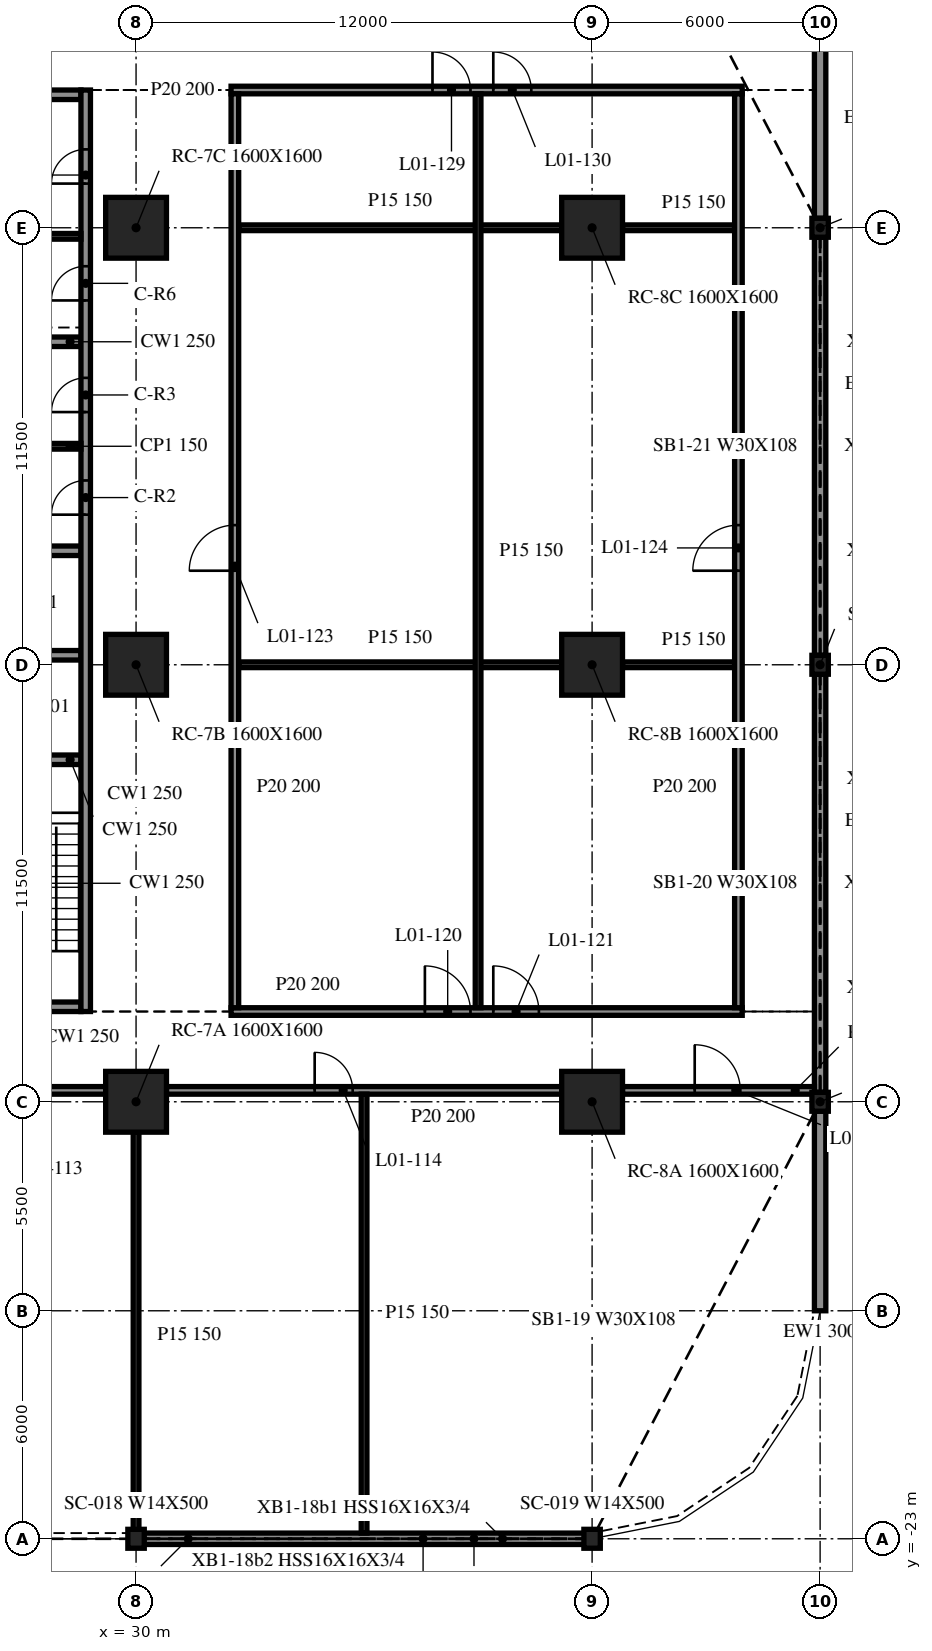
"""IFC4 building model, lengths in metres.
Left out: names, types, materials, properties, quantities, classifications, styles, units other than length and angle.
Written with IfcOpenShell. Run it as: python <this file> out.ifc"""

import sys

from ifc_helpers import new_model, si_unit, direction, frame, frame_2d, origin, origin_2d, place, context, subcontext, project, spatial, rectangle, i_section, extrude, element, fill, save


model = new_model("IFC4")
c1 = context("Model", 3, precision=1e-05, world=origin(), true_north=direction((0.0, 1.0)))
c2 = subcontext(c1, "Body", "Model", "MODEL_VIEW")
j1 = project(units=[si_unit("LENGTHUNIT", "METRE"), si_unit("PLANEANGLEUNIT", "RADIAN")], contexts=[c1])
p1 = place(None, origin())
s1 = spatial("IfcSite", under=j1, at=p1, CompositionType="ELEMENT")
p2 = place(p1, origin())
s2 = spatial("IfcBuilding", under=s1, at=p2, CompositionType="ELEMENT")
p3 = place(p2, frame((0.0, 0.0, 7.2)))
s3 = spatial("IfcBuildingStorey", under=s2, at=p3, CompositionType="ELEMENT", Elevation=7.2)
for number, where, z_axis, x_axis in (
    (1, (30.0, -11.5, -0.34), (0.0, 0.0, 1.0), (1.0, 0.0, 0.0)),
    (2, (30.0, 0.0, -0.34), (0.0, 0.0, 1.0), (1.0, 0.0, 0.0)),
    (3, (30.0, 11.5, -0.34), (0.0, 0.0, 1.0), (1.0, 0.0, 0.0)),
    (4, (42.0, -11.5, -0.34), (0.0, 0.0, 1.0), (1.0, 0.0, 0.0)),
    (5, (42.0, 0.0, -0.34), (0.0, 0.0, 1.0), (1.0, 0.0, 0.0)),
    (6, (42.0, 11.5, -0.34), (0.0, 0.0, 1.0), (1.0, 0.0, 0.0)),
):
    element("IfcColumn", number, at=place(p3, frame(where, z_axis=z_axis, x_axis=x_axis)), inside=s3, PredefinedType="COLUMN", context=c2, shape_type="SweptSolid", body=[
        extrude(rectangle(XDim=1.6, YDim=1.6, at=origin_2d()), origin(), (0.0, 0.0, 1.0), 4.3),
    ])
for number, where, z_axis, x_axis in (
    (7, (30.0, -23.0, -0.34), (0.0, 0.0, 1.0), (1.0, 0.0, 0.0)),
    (8, (42.0, -23.0, -0.34), (0.0, 0.0, 1.0), (1.0, 0.0, 0.0)),
    (9, (48.0, -11.5, -0.34), (0.0, 0.0, 1.0), (1.0, 0.0, 0.0)),
    (10, (48.0, 0.0, -0.34), (0.0, 0.0, 1.0), (1.0, 0.0, 0.0)),
    (11, (48.0, 11.5, -0.34), (0.0, 0.0, 1.0), (1.0, 0.0, 0.0)),
):
    element("IfcColumn", number, at=place(p3, frame(where, z_axis=z_axis, x_axis=x_axis)), inside=s3, PredefinedType="COLUMN", context=c2, shape_type="SweptSolid", body=[
        extrude(i_section(OverallWidth=0.432, OverallDepth=0.498, WebThickness=0.056, FlangeThickness=0.089, at=origin_2d()), origin(), (0.0, 0.0, 1.0), 4.3),
    ])
p4 = place(p3, frame((30.028, -23.0, 0.0), z_axis=(0.0, 0.0, 1.0), x_axis=(1.0, 0.0, 0.0)))
e12 = element("IfcWall", 12, at=p4, inside=s3, PredefinedType="NOTDEFINED", context=c2, shape_type="SweptSolid", body=[
    extrude(rectangle(XDim=11.944, YDim=0.3, at=frame_2d((5.972, 0.0))), origin(), (0.0, 0.0, 1.0), 3.203),
])
p5 = place(p3, frame((48.0, -17.0, 0.0), z_axis=(0.0, 0.0, 1.0), x_axis=(0.0, 1.0, 0.0)))
e13 = element("IfcWall", 13, at=p5, inside=s3, PredefinedType="NOTDEFINED", context=c2, shape_type="SweptSolid", body=[
    extrude(rectangle(XDim=5.251, YDim=0.3, at=frame_2d((2.625, 0.0))), origin(), (0.0, 0.0, 1.0), 3.203),
])
for number, where, z_axis, x_axis in (
    (14, (48.0, -11.251, 0.0), (0.0, 0.0, 1.0), (0.0, 1.0, 0.0)),
    (15, (48.0, 0.249, 0.0), (0.0, 0.0, 1.0), (0.0, 1.0, 0.0)),
):
    element("IfcWall", number, at=place(p3, frame(where, z_axis=z_axis, x_axis=x_axis)), inside=s3, PredefinedType="NOTDEFINED", context=c2, shape_type="SweptSolid", body=[
        extrude(rectangle(XDim=11.002, YDim=0.3, at=frame_2d((5.501, 0.0))), origin(), (0.0, 0.0, 1.0), 3.203),
    ])
p6 = place(p3, frame((48.0, 11.749, 0.0), z_axis=(0.0, 0.0, 1.0), x_axis=(0.0, 1.0, 0.0)))
e16 = element("IfcWall", 16, at=p6, inside=s3, PredefinedType="NOTDEFINED", context=c2, shape_type="SweptSolid", body=[
    extrude(rectangle(XDim=5.251, YDim=0.3, at=frame_2d((2.625, 0.0))), origin(), (0.0, 0.0, 1.0), 3.203),
])
p7 = place(p3, frame((28.675, -9.125, 0.0), z_axis=(0.0, 0.0, 1.0), x_axis=(0.0, 1.0, 0.0)))
e17 = element("IfcWall", 17, at=p7, inside=s3, PredefinedType="SOLIDWALL", context=c2, shape_type="SweptSolid", body=[
    extrude(rectangle(XDim=24.25, YDim=0.25, at=frame_2d((12.125, 0.0))), origin(), (0.0, 0.0, 1.0), 3.96),
])
p8 = place(p7, frame((13.075, 0.0, 0.0)))
e18 = element("IfcOpeningElement", 18, at=p8, cuts=e17, PredefinedType="OPENING", context=c2, shape_type="SweptSolid", body=[
    extrude(rectangle(XDim=0.9, YDim=2.1, at=frame_2d((0.45, 1.05))), frame((0.0, 0.135, 0.0), z_axis=(0.0, -1.0, 0.0), x_axis=(1.0, 0.0, 0.0)), (0.0, 0.0, 1.0), 0.27),
])
p9 = place(p7, frame((15.775, 0.0, 0.0)))
e19 = element("IfcOpeningElement", 19, at=p9, cuts=e17, PredefinedType="OPENING", context=c2, shape_type="SweptSolid", body=[
    extrude(rectangle(XDim=0.9, YDim=2.1, at=frame_2d((0.45, 1.05))), frame((0.0, 0.135, 0.0), z_axis=(0.0, -1.0, 0.0), x_axis=(1.0, 0.0, 0.0)), (0.0, 0.0, 1.0), 0.27),
])
p10 = place(p7, frame((18.712, 0.0, 0.0)))
e20 = element("IfcOpeningElement", 20, at=p10, cuts=e17, PredefinedType="OPENING", context=c2, shape_type="SweptSolid", body=[
    extrude(rectangle(XDim=0.9, YDim=2.1, at=frame_2d((0.45, 1.05))), frame((0.0, 0.135, 0.0), z_axis=(0.0, -1.0, 0.0), x_axis=(1.0, 0.0, 0.0)), (0.0, 0.0, 1.0), 0.27),
])
p11 = place(p7, frame((21.788, 0.0, 0.0)))
e21 = element("IfcOpeningElement", 21, at=p11, cuts=e17, PredefinedType="OPENING", context=c2, shape_type="SweptSolid", body=[
    extrude(rectangle(XDim=0.9, YDim=2.1, at=frame_2d((0.45, 1.05))), frame((0.0, 0.135, 0.0), z_axis=(0.0, -1.0, 0.0), x_axis=(1.0, 0.0, 0.0)), (0.0, 0.0, 1.0), 0.27),
])
p12 = place(p3, frame((28.55, -9.0, 0.0), z_axis=(0.0, 0.0, 1.0), x_axis=(-1.0, 0.0, 0.0)))
e22 = element("IfcWall", 22, at=p12, inside=s3, PredefinedType="SOLIDWALL", context=c2, shape_type="SweptSolid", body=[
    extrude(rectangle(XDim=9.1, YDim=0.25, at=frame_2d((4.55, 0.0))), origin(), (0.0, 0.0, 1.0), 3.96),
])
p13 = place(p12, frame((3.65, 0.0, 0.0)))
e23 = element("IfcOpeningElement", 23, at=p13, cuts=e22, PredefinedType="OPENING", context=c2, shape_type="SweptSolid", body=[
    extrude(rectangle(XDim=1.8, YDim=2.1, at=frame_2d((0.9, 1.05))), frame((0.0, 0.135, 0.0), z_axis=(0.0, -1.0, 0.0), x_axis=(1.0, 0.0, 0.0)), (0.0, 0.0, 1.0), 0.27),
])
p14 = place(p3, frame((19.45, 15.0, 0.0), z_axis=(0.0, 0.0, 1.0), x_axis=(1.0, 0.0, 0.0)))
e24 = element("IfcWall", 24, at=p14, inside=s3, PredefinedType="SOLIDWALL", context=c2, shape_type="SweptSolid", body=[
    extrude(rectangle(XDim=9.1, YDim=0.25, at=frame_2d((4.55, 0.0))), origin(), (0.0, 0.0, 1.0), 3.96),
])
p15 = place(p14, frame((3.65, 0.0, 0.0)))
e25 = element("IfcOpeningElement", 25, at=p15, cuts=e24, PredefinedType="OPENING", context=c2, shape_type="SweptSolid", body=[
    extrude(rectangle(XDim=1.8, YDim=2.1, at=frame_2d((0.9, 1.05))), frame((0.0, 0.135, 0.0), z_axis=(0.0, -1.0, 0.0), x_axis=(1.0, 0.0, 0.0)), (0.0, 0.0, 1.0), 0.27),
])
for number, where, z_axis, x_axis in (
    (26, (25.7, -2.5, 0.0), (0.0, 0.0, 1.0), (1.0, 0.0, 0.0)),
    (27, (25.7, 0.25, 0.0), (0.0, 0.0, 1.0), (1.0, 0.0, 0.0)),
    (28, (25.7, 3.0, 0.0), (0.0, 0.0, 1.0), (1.0, 0.0, 0.0)),
    (29, (25.7, 8.5, 0.0), (0.0, 0.0, 1.0), (1.0, 0.0, 0.0)),
):
    element("IfcWall", number, at=place(p3, frame(where, z_axis=z_axis, x_axis=x_axis)), inside=s3, PredefinedType="SOLIDWALL", context=c2, shape_type="SweptSolid", body=[
        extrude(rectangle(XDim=2.85, YDim=0.25, at=frame_2d((1.425, 0.0))), origin(), (0.0, 0.0, 1.0), 3.96),
    ])
for number, where, z_axis, x_axis in (
    (30, (25.7, 5.75, 0.0), (0.0, 0.0, 1.0), (1.0, 0.0, 0.0)),
    (31, (25.7, 11.275, 0.0), (0.0, 0.0, 1.0), (1.0, 0.0, 0.0)),
):
    element("IfcWall", number, at=place(p3, frame(where, z_axis=z_axis, x_axis=x_axis)), inside=s3, PredefinedType="PARTITIONING", context=c2, shape_type="SweptSolid", body=[
        extrude(rectangle(XDim=2.85, YDim=0.15, at=frame_2d((1.425, 0.0))), origin(), (0.0, 0.0, 1.0), 3.96),
    ])
p16 = place(p3, frame((18.8, -11.2, 0.0), z_axis=(0.0, 0.0, 1.0), x_axis=(1.0, 0.0, 0.0)))
e32 = element("IfcWall", 32, at=p16, inside=s3, PredefinedType="PARTITIONING", context=c2, shape_type="SweptSolid", body=[
    extrude(rectangle(XDim=10.4, YDim=0.2, at=frame_2d((5.2, 0.0))), origin(), (0.0, 0.0, 1.0), 3.96),
])
p17 = place(p16, frame((3.7, 0.0, 0.0)))
e33 = element("IfcOpeningElement", 33, at=p17, cuts=e32, PredefinedType="OPENING", context=c2, shape_type="SweptSolid", body=[
    extrude(rectangle(XDim=1.2, YDim=2.1, at=frame_2d((0.6, 1.05))), frame((0.0, 0.11, 0.0), z_axis=(0.0, -1.0, 0.0), x_axis=(1.0, 0.0, 0.0)), (0.0, 0.0, 1.0), 0.22),
])
p18 = place(p16, frame((5.5, 0.0, 0.0)))
e34 = element("IfcOpeningElement", 34, at=p18, cuts=e32, PredefinedType="OPENING", context=c2, shape_type="SweptSolid", body=[
    extrude(rectangle(XDim=1.2, YDim=2.1, at=frame_2d((0.6, 1.05))), frame((0.0, 0.11, 0.0), z_axis=(0.0, -1.0, 0.0), x_axis=(1.0, 0.0, 0.0)), (0.0, 0.0, 1.0), 0.22),
])
p19 = place(p3, frame((30.8, -11.2, 0.0), z_axis=(0.0, 0.0, 1.0), x_axis=(1.0, 0.0, 0.0)))
e35 = element("IfcWall", 35, at=p19, inside=s3, PredefinedType="PARTITIONING", context=c2, shape_type="SweptSolid", body=[
    extrude(rectangle(XDim=10.4, YDim=0.2, at=frame_2d((5.2, 0.0))), origin(), (0.0, 0.0, 1.0), 3.96),
])
p20 = place(p19, frame((3.9, 0.0, 0.0)))
e36 = element("IfcOpeningElement", 36, at=p20, cuts=e35, PredefinedType="OPENING", context=c2, shape_type="SweptSolid", body=[
    extrude(rectangle(XDim=1.0, YDim=2.1, at=frame_2d((0.5, 1.05))), frame((0.0, 0.11, 0.0), z_axis=(0.0, -1.0, 0.0), x_axis=(1.0, 0.0, 0.0)), (0.0, 0.0, 1.0), 0.22),
])
p21 = place(p3, frame((42.8, -11.2, 0.0), z_axis=(0.0, 0.0, 1.0), x_axis=(1.0, 0.0, 0.0)))
e37 = element("IfcWall", 37, at=p21, inside=s3, PredefinedType="PARTITIONING", context=c2, shape_type="SweptSolid", body=[
    extrude(rectangle(XDim=5.05, YDim=0.2, at=frame_2d((2.525, 0.0))), origin(), (0.0, 0.0, 1.0), 3.96),
])
p22 = place(p21, frame((1.9, 0.0, 0.0)))
e38 = element("IfcOpeningElement", 38, at=p22, cuts=e37, PredefinedType="OPENING", context=c2, shape_type="SweptSolid", body=[
    extrude(rectangle(XDim=1.2, YDim=2.1, at=frame_2d((0.6, 1.05))), frame((0.0, 0.11, 0.0), z_axis=(0.0, -1.0, 0.0), x_axis=(1.0, 0.0, 0.0)), (0.0, 0.0, 1.0), 0.22),
])
p23 = place(p3, frame((32.5, -9.125, 0.0), z_axis=(0.0, 0.0, 1.0), x_axis=(1.0, 0.0, 0.0)))
e39 = element("IfcWall", 39, at=p23, inside=s3, PredefinedType="PARTITIONING", context=c2, shape_type="SweptSolid", body=[
    extrude(rectangle(XDim=13.45, YDim=0.2, at=frame_2d((6.725, 0.0))), origin(), (0.0, 0.0, 1.0), 3.96),
])
p24 = place(p23, frame((5.1, 0.0, 0.0)))
e40 = element("IfcOpeningElement", 40, at=p24, cuts=e39, PredefinedType="OPENING", context=c2, shape_type="SweptSolid", body=[
    extrude(rectangle(XDim=1.2, YDim=2.1, at=frame_2d((0.6, 1.05))), frame((0.0, 0.11, 0.0), z_axis=(0.0, -1.0, 0.0), x_axis=(1.0, 0.0, 0.0)), (0.0, 0.0, 1.0), 0.22),
])
p25 = place(p23, frame((6.9, 0.0, 0.0)))
e41 = element("IfcOpeningElement", 41, at=p25, cuts=e39, PredefinedType="OPENING", context=c2, shape_type="SweptSolid", body=[
    extrude(rectangle(XDim=1.2, YDim=2.1, at=frame_2d((0.6, 1.05))), frame((0.0, 0.11, 0.0), z_axis=(0.0, -1.0, 0.0), x_axis=(1.0, 0.0, 0.0)), (0.0, 0.0, 1.0), 0.22),
])
p26 = place(p3, frame((32.7, 0.0, 0.0), z_axis=(0.0, 0.0, 1.0), x_axis=(1.0, 0.0, 0.0)))
e42 = element("IfcWall", 42, at=p26, inside=s3, PredefinedType="PARTITIONING", context=c2, shape_type="SweptSolid", body=[
    extrude(rectangle(XDim=8.5, YDim=0.15, at=frame_2d((4.25, 0.0))), origin(), (0.0, 0.0, 1.0), 3.96),
])
p27 = place(p3, frame((42.8, 0.0, 0.0), z_axis=(0.0, 0.0, 1.0), x_axis=(1.0, 0.0, 0.0)))
e43 = element("IfcWall", 43, at=p27, inside=s3, PredefinedType="PARTITIONING", context=c2, shape_type="SweptSolid", body=[
    extrude(rectangle(XDim=2.95, YDim=0.15, at=frame_2d((1.475, 0.0))), origin(), (0.0, 0.0, 1.0), 3.96),
])
p28 = place(p3, frame((32.7, 11.5, 0.0), z_axis=(0.0, 0.0, 1.0), x_axis=(1.0, 0.0, 0.0)))
e44 = element("IfcWall", 44, at=p28, inside=s3, PredefinedType="PARTITIONING", context=c2, shape_type="SweptSolid", body=[
    extrude(rectangle(XDim=8.5, YDim=0.15, at=frame_2d((4.25, 0.0))), origin(), (0.0, 0.0, 1.0), 3.96),
])
p29 = place(p3, frame((42.8, 11.5, 0.0), z_axis=(0.0, 0.0, 1.0), x_axis=(1.0, 0.0, 0.0)))
e45 = element("IfcWall", 45, at=p29, inside=s3, PredefinedType="PARTITIONING", context=c2, shape_type="SweptSolid", body=[
    extrude(rectangle(XDim=2.95, YDim=0.15, at=frame_2d((1.475, 0.0))), origin(), (0.0, 0.0, 1.0), 3.96),
])
p30 = place(p3, frame((32.5, 15.125, 0.0), z_axis=(0.0, 0.0, 1.0), x_axis=(1.0, 0.0, 0.0)))
e46 = element("IfcWall", 46, at=p30, inside=s3, PredefinedType="PARTITIONING", context=c2, shape_type="SweptSolid", body=[
    extrude(rectangle(XDim=13.45, YDim=0.2, at=frame_2d((6.725, 0.0))), origin(), (0.0, 0.0, 1.0), 3.96),
])
p31 = place(p30, frame((5.3, 0.0, 0.0)))
e47 = element("IfcOpeningElement", 47, at=p31, cuts=e46, PredefinedType="OPENING", context=c2, shape_type="SweptSolid", body=[
    extrude(rectangle(XDim=1.0, YDim=2.1, at=frame_2d((0.5, 1.05))), frame((0.0, 0.11, 0.0), z_axis=(0.0, -1.0, 0.0), x_axis=(1.0, 0.0, 0.0)), (0.0, 0.0, 1.0), 0.22),
])
p32 = place(p30, frame((6.9, 0.0, 0.0)))
e48 = element("IfcOpeningElement", 48, at=p32, cuts=e46, PredefinedType="OPENING", context=c2, shape_type="SweptSolid", body=[
    extrude(rectangle(XDim=1.0, YDim=2.1, at=frame_2d((0.5, 1.05))), frame((0.0, 0.11, 0.0), z_axis=(0.0, -1.0, 0.0), x_axis=(1.0, 0.0, 0.0)), (0.0, 0.0, 1.0), 0.22),
])
p33 = place(p3, frame((30.0, -22.975, 0.0), z_axis=(0.0, 0.0, 1.0), x_axis=(0.0, 1.0, 0.0)))
e49 = element("IfcWall", 49, at=p33, inside=s3, PredefinedType="PARTITIONING", context=c2, shape_type="SweptSolid", body=[
    extrude(rectangle(XDim=10.675, YDim=0.15, at=frame_2d((5.337, 0.0))), origin(), (0.0, 0.0, 1.0), 3.96),
])
p34 = place(p3, frame((32.6, -9.025, 0.0), z_axis=(0.0, 0.0, 1.0), x_axis=(0.0, 1.0, 0.0)))
e50 = element("IfcWall", 50, at=p34, inside=s3, PredefinedType="PARTITIONING", context=c2, shape_type="SweptSolid", body=[
    extrude(rectangle(XDim=24.05, YDim=0.2, at=frame_2d((12.025, 0.0))), origin(), (0.0, 0.0, 1.0), 3.96),
])
p35 = place(p34, frame((11.5, 0.0, 0.0)))
e51 = element("IfcOpeningElement", 51, at=p35, cuts=e50, PredefinedType="OPENING", context=c2, shape_type="SweptSolid", body=[
    extrude(rectangle(XDim=1.2, YDim=2.1, at=frame_2d((0.6, 1.05))), frame((0.0, 0.11, 0.0), z_axis=(0.0, -1.0, 0.0), x_axis=(1.0, 0.0, 0.0)), (0.0, 0.0, 1.0), 0.22),
])
p36 = place(p3, frame((36.0, -22.85, 0.0), z_axis=(0.0, 0.0, 1.0), x_axis=(0.0, 1.0, 0.0)))
e52 = element("IfcWall", 52, at=p36, inside=s3, PredefinedType="PARTITIONING", context=c2, shape_type="SweptSolid", body=[
    extrude(rectangle(XDim=11.55, YDim=0.15, at=frame_2d((5.775, 0.0))), origin(), (0.0, 0.0, 1.0), 3.96),
])
p37 = place(p3, frame((39.0, -9.025, 0.0), z_axis=(0.0, 0.0, 1.0), x_axis=(0.0, 1.0, 0.0)))
e53 = element("IfcWall", 53, at=p37, inside=s3, PredefinedType="PARTITIONING", context=c2, shape_type="SweptSolid", body=[
    extrude(rectangle(XDim=24.05, YDim=0.15, at=frame_2d((12.025, 0.0))), origin(), (0.0, 0.0, 1.0), 3.96),
])
p38 = place(p3, frame((45.85, -9.025, 0.0), z_axis=(0.0, 0.0, 1.0), x_axis=(0.0, 1.0, 0.0)))
e54 = element("IfcWall", 54, at=p38, inside=s3, PredefinedType="PARTITIONING", context=c2, shape_type="SweptSolid", body=[
    extrude(rectangle(XDim=24.05, YDim=0.2, at=frame_2d((12.025, 0.0))), origin(), (0.0, 0.0, 1.0), 3.96),
])
p39 = place(p38, frame((11.5, 0.0, 0.0)))
e55 = element("IfcOpeningElement", 55, at=p39, cuts=e54, PredefinedType="OPENING", context=c2, shape_type="SweptSolid", body=[
    extrude(rectangle(XDim=1.2, YDim=2.1, at=frame_2d((0.6, 1.05))), frame((0.0, 0.11, 0.0), z_axis=(0.0, -1.0, 0.0), x_axis=(1.0, 0.0, 0.0)), (0.0, 0.0, 1.0), 0.22),
])
p40 = place(p8, origin())
e56 = element("IfcDoor", 56, at=p40, inside=s3, OperationType="SINGLE_SWING_RIGHT", PredefinedType="DOOR", context=c2, shape_type="SweptSolid", body=[
    extrude(rectangle(XDim=0.9, YDim=2.1, at=frame_2d((0.45, 1.05))), frame((0.0, 0.025, 0.0), z_axis=(0.0, -1.0, 0.0), x_axis=(1.0, 0.0, 0.0)), (0.0, 0.0, 1.0), 0.05),
])
fill(e18, e56)
p41 = place(p9, origin())
e57 = element("IfcDoor", 57, at=p41, inside=s3, OperationType="SINGLE_SWING_LEFT", PredefinedType="DOOR", context=c2, shape_type="SweptSolid", body=[
    extrude(rectangle(XDim=0.9, YDim=2.1, at=frame_2d((0.45, 1.05))), frame((0.0, 0.025, 0.0), z_axis=(0.0, -1.0, 0.0), x_axis=(1.0, 0.0, 0.0)), (0.0, 0.0, 1.0), 0.05),
])
fill(e19, e57)
p42 = place(p10, origin())
e58 = element("IfcDoor", 58, at=p42, inside=s3, OperationType="SINGLE_SWING_RIGHT", PredefinedType="DOOR", context=c2, shape_type="SweptSolid", body=[
    extrude(rectangle(XDim=0.9, YDim=2.1, at=frame_2d((0.45, 1.05))), frame((0.0, 0.025, 0.0), z_axis=(0.0, -1.0, 0.0), x_axis=(1.0, 0.0, 0.0)), (0.0, 0.0, 1.0), 0.05),
])
fill(e20, e58)
p43 = place(p11, origin())
e59 = element("IfcDoor", 59, at=p43, inside=s3, OperationType="SINGLE_SWING_LEFT", PredefinedType="DOOR", context=c2, shape_type="SweptSolid", body=[
    extrude(rectangle(XDim=0.9, YDim=2.1, at=frame_2d((0.45, 1.05))), frame((0.0, 0.025, 0.0), z_axis=(0.0, -1.0, 0.0), x_axis=(1.0, 0.0, 0.0)), (0.0, 0.0, 1.0), 0.05),
])
fill(e21, e59)
p44 = place(p20, origin())
e60 = element("IfcDoor", 60, at=p44, inside=s3, OperationType="SINGLE_SWING_RIGHT", PredefinedType="DOOR", context=c2, shape_type="SweptSolid", body=[
    extrude(rectangle(XDim=1.0, YDim=2.1, at=frame_2d((0.5, 1.05))), frame((0.0, 0.025, 0.0), z_axis=(0.0, -1.0, 0.0), x_axis=(1.0, 0.0, 0.0)), (0.0, 0.0, 1.0), 0.05),
])
fill(e36, e60)
p45 = place(p22, origin())
e61 = element("IfcDoor", 61, at=p45, inside=s3, OperationType="SINGLE_SWING_RIGHT", PredefinedType="DOOR", context=c2, shape_type="SweptSolid", body=[
    extrude(rectangle(XDim=1.2, YDim=2.1, at=frame_2d((0.6, 1.05))), frame((0.0, 0.025, 0.0), z_axis=(0.0, -1.0, 0.0), x_axis=(1.0, 0.0, 0.0)), (0.0, 0.0, 1.0), 0.05),
])
fill(e38, e61)
p46 = place(p24, origin())
e62 = element("IfcDoor", 62, at=p46, inside=s3, OperationType="SINGLE_SWING_LEFT", PredefinedType="DOOR", context=c2, shape_type="SweptSolid", body=[
    extrude(rectangle(XDim=1.2, YDim=2.1, at=frame_2d((0.6, 1.05))), frame((0.0, 0.025, 0.0), z_axis=(0.0, -1.0, 0.0), x_axis=(1.0, 0.0, 0.0)), (0.0, 0.0, 1.0), 0.05),
])
fill(e40, e62)
p47 = place(p25, origin())
e63 = element("IfcDoor", 63, at=p47, inside=s3, OperationType="SINGLE_SWING_RIGHT", PredefinedType="DOOR", context=c2, shape_type="SweptSolid", body=[
    extrude(rectangle(XDim=1.2, YDim=2.1, at=frame_2d((0.6, 1.05))), frame((0.0, 0.025, 0.0), z_axis=(0.0, -1.0, 0.0), x_axis=(1.0, 0.0, 0.0)), (0.0, 0.0, 1.0), 0.05),
])
fill(e41, e63)
p48 = place(p35, origin())
e64 = element("IfcDoor", 64, at=p48, inside=s3, OperationType="SINGLE_SWING_LEFT", PredefinedType="DOOR", context=c2, shape_type="SweptSolid", body=[
    extrude(rectangle(XDim=1.2, YDim=2.1, at=frame_2d((0.6, 1.05))), frame((0.0, 0.025, 0.0), z_axis=(0.0, -1.0, 0.0), x_axis=(1.0, 0.0, 0.0)), (0.0, 0.0, 1.0), 0.05),
])
fill(e51, e64)
p49 = place(p39, origin())
e65 = element("IfcDoor", 65, at=p49, inside=s3, OperationType="SINGLE_SWING_RIGHT", PredefinedType="DOOR", context=c2, shape_type="SweptSolid", body=[
    extrude(rectangle(XDim=1.2, YDim=2.1, at=frame_2d((0.6, 1.05))), frame((0.0, 0.025, 0.0), z_axis=(0.0, -1.0, 0.0), x_axis=(1.0, 0.0, 0.0)), (0.0, 0.0, 1.0), 0.05),
])
fill(e55, e65)
p50 = place(p31, origin())
e66 = element("IfcDoor", 66, at=p50, inside=s3, OperationType="SINGLE_SWING_RIGHT", PredefinedType="DOOR", context=c2, shape_type="SweptSolid", body=[
    extrude(rectangle(XDim=1.0, YDim=2.1, at=frame_2d((0.5, 1.05))), frame((0.0, 0.025, 0.0), z_axis=(0.0, -1.0, 0.0), x_axis=(1.0, 0.0, 0.0)), (0.0, 0.0, 1.0), 0.05),
])
fill(e47, e66)
p51 = place(p32, origin())
e67 = element("IfcDoor", 67, at=p51, inside=s3, OperationType="SINGLE_SWING_LEFT", PredefinedType="DOOR", context=c2, shape_type="SweptSolid", body=[
    extrude(rectangle(XDim=1.0, YDim=2.1, at=frame_2d((0.5, 1.05))), frame((0.0, 0.025, 0.0), z_axis=(0.0, -1.0, 0.0), x_axis=(1.0, 0.0, 0.0)), (0.0, 0.0, 1.0), 0.05),
])
fill(e48, e67)
save(model, sys.argv[1])
